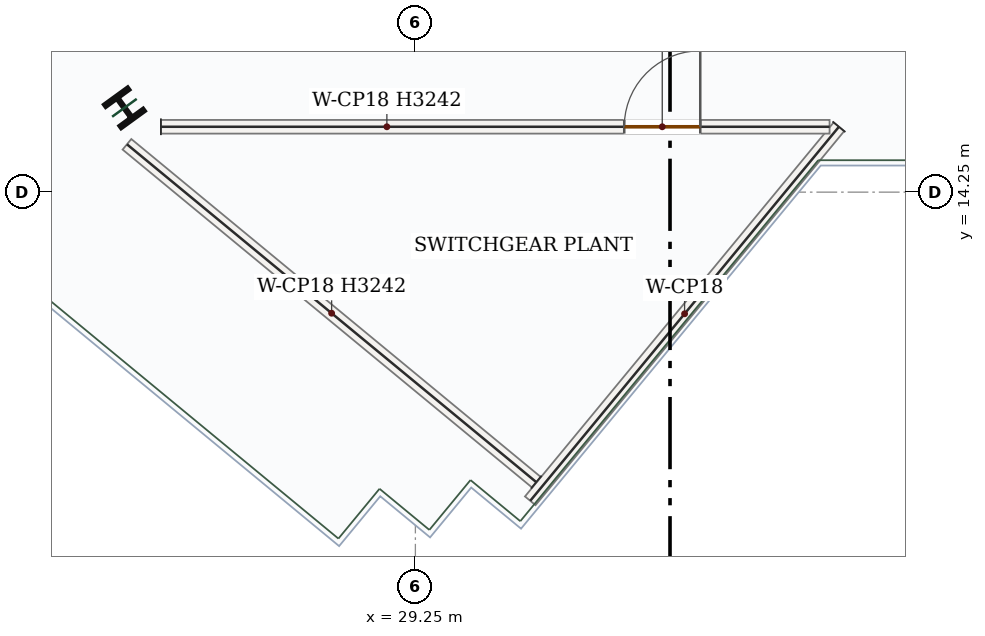
"""IFC4 building model, lengths in metres.
Left out: names, types, materials, properties, quantities, classifications, styles, units other than length and angle.
Written with IfcOpenShell. Run it as: python <this file> out.ifc"""

import sys

from ifc_helpers import new_model, si_unit, direction, frame, frame_2d, origin, origin_2d, place, context, subcontext, project, spatial, rectangle, i_section, extrude, source, transform, mapped, element, fill, save


model = new_model("IFC4")
c1 = context("Model", 3, precision=1e-05, world=origin(), true_north=direction((0.0, 1.0)))
c2 = subcontext(c1, "Body", "Model", "MODEL_VIEW")
j1 = project(units=[si_unit("LENGTHUNIT", "METRE"), si_unit("PLANEANGLEUNIT", "RADIAN")], contexts=[c1])
p1 = place(None, origin())
s1 = spatial("IfcSite", under=j1, at=p1, CompositionType="ELEMENT")
p2 = place(p1, origin())
s2 = spatial("IfcBuilding", under=s1, at=p2, CompositionType="ELEMENT")
p3 = place(p2, frame((0.0, 0.0, 314.1)))
s3 = spatial("IfcBuildingStorey", under=s2, at=p3, CompositionType="ELEMENT", Elevation=314.1)
m1 = source(origin(), c2, "Body", "SweptSolid", [
    extrude(i_section(OverallWidth=0.374, OverallDepth=0.372, WebThickness=0.016, FlangeThickness=0.026, FilletRadius=0.018, at=origin_2d()), origin(), (0.0, 0.0, 1.0), 5.7),
])
p4 = place(p3, frame((25.422, 15.359, 0.0), z_axis=(0.0, 0.0, 1.0), x_axis=(0.809016994375, 0.587785252292, 0.0)))
e1 = element("IfcColumn", 1, at=p4, inside=s3, PredefinedType="COLUMN", context=c2, shape_type="MappedRepresentation", body=[
    mapped(m1, transform((0.0, 0.0, 0.0), x_axis=(1.0, 0.0, 0.0), y_axis=(0.0, 1.0, 0.0), z_axis=(0.0, 0.0, 1.0), scale=1.0)),
])
m2 = source(origin(), c2, "Body", "SweptSolid", [
    extrude(rectangle(XDim=6.38, YDim=0.18, at=frame_2d((3.19, 0.0))), origin(), (0.0, 0.0, 1.0), 5.45),
])
p5 = place(p3, frame((34.822, 15.11, 0.0), z_axis=(0.0, 0.0, 1.0), x_axis=(-0.636503619764, -0.771273714078, 0.0)))
e2 = element("IfcWall", 2, at=p5, inside=s3, PredefinedType="PARTITIONING", context=c2, shape_type="MappedRepresentation", body=[
    mapped(m2, transform((0.0, 0.0, 0.0), x_axis=(1.0, 0.0, 0.0), y_axis=(0.0, 1.0, 0.0), z_axis=(0.0, 0.0, 1.0), scale=1.0)),
])
m3 = source(origin(), c2, "Body", "SweptSolid", [
    extrude(rectangle(XDim=6.982, YDim=0.18, at=frame_2d((3.491, 0.0))), origin(), (0.0, 0.0, 1.0), 3.242),
])
p6 = place(p3, frame((30.841, 10.435, 0.0), z_axis=(0.0, 0.0, 1.0), x_axis=(-0.7712505433, 0.636531695565, 0.0)))
e3 = element("IfcWall", 3, at=p6, inside=s3, PredefinedType="PARTITIONING", context=c2, shape_type="MappedRepresentation", body=[
    mapped(m3, transform((0.0, 0.0, 0.0), x_axis=(1.0, 0.0, 0.0), y_axis=(0.0, 1.0, 0.0), z_axis=(0.0, 0.0, 1.0), scale=1.0)),
])
p7 = place(p3, frame((25.902, 15.11, 0.0), z_axis=(0.0, 0.0, 1.0), x_axis=(1.0, 0.0, 0.0)))
e4 = element("IfcWall", 4, at=p7, inside=s3, PredefinedType="PARTITIONING", context=c2, shape_type="SweptSolid", body=[
    extrude(rectangle(XDim=8.797, YDim=0.18, at=frame_2d((4.398, 0.0))), origin(), (0.0, 0.0, 1.0), 3.242),
])
p8 = place(p7, frame((6.096, 0.0, 0.0)))
e5 = element("IfcOpeningElement", 5, at=p8, cuts=e4, PredefinedType="OPENING", context=c2, shape_type="SweptSolid", body=[
    extrude(rectangle(XDim=1.0, YDim=2.15, at=frame_2d((0.5, 1.075))), frame((0.0, 0.1, 0.0), z_axis=(0.0, -1.0, 0.0), x_axis=(1.0, 0.0, 0.0)), (0.0, 0.0, 1.0), 0.2),
])
m4 = source(origin(), c2, "Body", "SweptSolid", [
    extrude(rectangle(XDim=1.0, YDim=2.15, at=frame_2d((0.5, 1.075))), frame((0.0, 0.025, 0.0), z_axis=(0.0, -1.0, 0.0), x_axis=(1.0, 0.0, 0.0)), (0.0, 0.0, 1.0), 0.05),
])
p9 = place(p8, origin())
e6 = element("IfcDoor", 6, at=p9, inside=s3, OperationType="SINGLE_SWING_RIGHT", PredefinedType="DOOR", context=c2, shape_type="MappedRepresentation", body=[
    mapped(m4, transform((0.0, 0.0, 0.0), x_axis=(1.0, 0.0, 0.0), y_axis=(0.0, 1.0, 0.0), z_axis=(0.0, 0.0, 1.0), scale=1.0)),
])
fill(e5, e6)
save(model, sys.argv[1])
